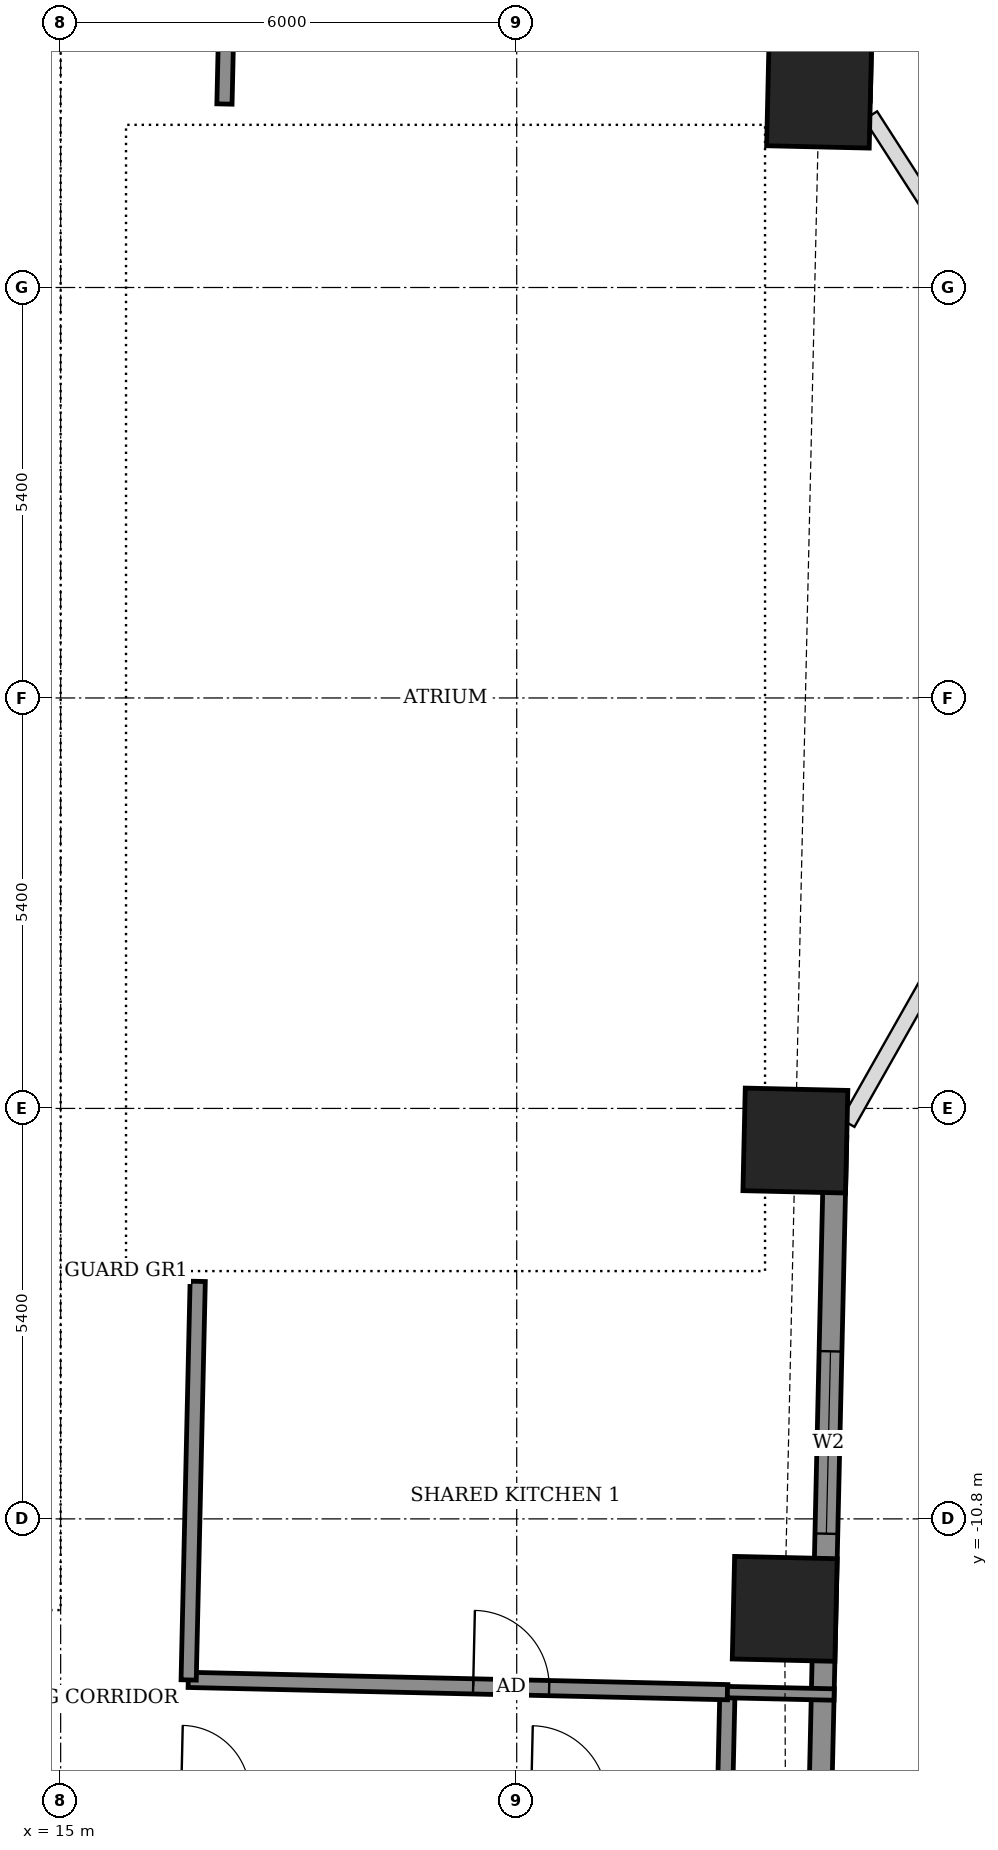
"""IFC4 building model, lengths in metres.
Left out: names, types, materials, properties, quantities, classifications, styles, units other than length and angle.
Written with IfcOpenShell. Run it as: python <this file> out.ifc"""

import sys

from ifc_helpers import new_model, si_unit, direction, frame, frame_2d, origin, origin_2d, place, context, subcontext, project, spatial, rectangle, extrude, element, fill, save


model = new_model("IFC4")
c1 = context("Model", 3, precision=1e-05, world=origin(), true_north=direction((0.0, 1.0)))
c2 = subcontext(c1, "Body", "Model", "MODEL_VIEW")
j1 = project(units=[si_unit("LENGTHUNIT", "METRE"), si_unit("PLANEANGLEUNIT", "RADIAN")], contexts=[c1])
p1 = place(None, origin())
s1 = spatial("IfcSite", under=j1, at=p1, CompositionType="ELEMENT")
p2 = place(p1, origin())
s2 = spatial("IfcBuilding", under=s1, at=p2, CompositionType="ELEMENT")
p3 = place(p2, frame((0.0, 0.0, 112.7)))
s3 = spatial("IfcBuildingStorey", under=s2, at=p3, CompositionType="ELEMENT", Elevation=112.7)
for number, where, z_axis, x_axis in (
    (1, (24.526, -11.984, -0.55), (0.0, 0.0, 1.0), (0.023, 1.0, 0.0)),
    (2, (24.666, -5.823, -0.55), (0.0, 0.0, 1.0), (0.023, 1.0, 0.0)),
    (3, (24.978, 7.924, -0.55), (0.0, 0.0, 1.0), (0.023, 1.0, 0.0)),
):
    element("IfcColumn", number, at=place(p3, frame(where, z_axis=z_axis, x_axis=x_axis)), inside=s3, PredefinedType="COLUMN", context=c2, shape_type="SweptSolid", body=[
        extrude(rectangle(XDim=1.35, YDim=1.35, at=origin_2d()), origin(), (0.0, 0.0, 1.0), 3.6),
    ])
p4 = place(p3, frame((24.915, -18.007, 0.0), z_axis=(0.0, 0.0, 1.0), x_axis=(0.02263706344, 0.999743748847, 0.0)))
e4 = element("IfcWall", 4, at=p4, inside=s3, PredefinedType="SOLIDWALL", context=c2, shape_type="SweptSolid", body=[
    extrude(rectangle(XDim=12.23, YDim=0.3, at=frame_2d((6.115, 0.0))), origin(), (0.0, 0.0, 1.0), 3.05),
])
p5 = place(p4, frame((2.187, 0.0, 0.0)))
e5 = element("IfcOpeningElement", 5, at=p5, cuts=e4, PredefinedType="OPENING", context=c2, shape_type="SweptSolid", body=[
    extrude(rectangle(XDim=1.5, YDim=2.4, at=frame_2d((0.75, 1.2))), frame((0.0, 0.16, 0.0), z_axis=(0.0, -1.0, 0.0), x_axis=(1.0, 0.0, 0.0)), (0.0, 0.0, 1.0), 0.32),
])
p6 = place(p4, frame((7.014, 0.0, 0.9)))
e6 = element("IfcOpeningElement", 6, at=p6, cuts=e4, PredefinedType="OPENING", context=c2, shape_type="SweptSolid", body=[
    extrude(rectangle(XDim=2.4, YDim=1.5, at=frame_2d((1.2, 0.75))), frame((0.0, 0.16, 0.0), z_axis=(0.0, -1.0, 0.0), x_axis=(1.0, 0.0, 0.0)), (0.0, 0.0, 1.0), 0.32),
])
p7 = place(p3, frame((25.502, 7.857, 0.0), z_axis=(0.0, 0.0, 1.0), x_axis=(0.022680323815, 0.999742768372, 0.0)))
e7 = element("IfcWall", 7, at=p7, inside=s3, PredefinedType="SOLIDWALL", context=c2, shape_type="SweptSolid", body=[
    extrude(rectangle(XDim=13.229, YDim=0.3, at=frame_2d((6.615, 0.0))), origin(), (0.0, 0.0, 1.0), 3.05),
])
p8 = place(p7, frame((1.542, 0.0, 0.0)))
e8 = element("IfcOpeningElement", 8, at=p8, cuts=e7, PredefinedType="OPENING", context=c2, shape_type="SweptSolid", body=[
    extrude(rectangle(XDim=1.5, YDim=2.4, at=frame_2d((0.75, 1.2))), frame((0.0, 0.16, 0.0), z_axis=(0.0, -1.0, 0.0), x_axis=(1.0, 0.0, 0.0)), (0.0, 0.0, 1.0), 0.32),
])
p9 = place(p7, frame((4.403, 0.0, 0.9)))
e9 = element("IfcOpeningElement", 9, at=p9, cuts=e7, PredefinedType="OPENING", context=c2, shape_type="SweptSolid", body=[
    extrude(rectangle(XDim=0.9, YDim=1.5, at=frame_2d((0.45, 0.75))), frame((0.0, 0.16, 0.0), z_axis=(0.0, -1.0, 0.0), x_axis=(1.0, 0.0, 0.0)), (0.0, 0.0, 1.0), 0.32),
])
p10 = place(p7, frame((8.549, 0.0, 0.9)))
e10 = element("IfcOpeningElement", 10, at=p10, cuts=e7, PredefinedType="OPENING", context=c2, shape_type="SweptSolid", body=[
    extrude(rectangle(XDim=2.4, YDim=1.5, at=frame_2d((1.2, 0.75))), frame((0.0, 0.16, 0.0), z_axis=(0.0, -1.0, 0.0), x_axis=(1.0, 0.0, 0.0)), (0.0, 0.0, 1.0), 0.32),
])
p11 = place(p3, frame((-26.978, -13.428, 0.0), z_axis=(0.0, 0.0, 1.0), x_axis=(0.999742553034, -0.02268981385, 0.0)))
e11 = element("IfcWall", 11, at=p11, inside=s3, PredefinedType="PARTITIONING", context=c2, shape_type="SweptSolid", body=[
    extrude(rectangle(XDim=50.733, YDim=0.2, at=frame_2d((25.366, 0.0))), origin(), (0.0, 0.0, 1.0), 3.05),
])
p12 = place(p11, frame((2.293, 0.0, 0.0)))
e12 = element("IfcOpeningElement", 12, at=p12, cuts=e11, PredefinedType="OPENING", context=c2, shape_type="SweptSolid", body=[
    extrude(rectangle(XDim=1.0, YDim=2.1, at=frame_2d((0.5, 1.05))), frame((0.0, 0.11, 0.0), z_axis=(0.0, -1.0, 0.0), x_axis=(1.0, 0.0, 0.0)), (0.0, 0.0, 1.0), 0.22),
])
p13 = place(p11, frame((9.65, 0.0, 0.0)))
e13 = element("IfcOpeningElement", 13, at=p13, cuts=e11, PredefinedType="OPENING", context=c2, shape_type="SweptSolid", body=[
    extrude(rectangle(XDim=0.9, YDim=2.1, at=frame_2d((0.45, 1.05))), frame((0.0, 0.11, 0.0), z_axis=(0.0, -1.0, 0.0), x_axis=(1.0, 0.0, 0.0)), (0.0, 0.0, 1.0), 0.22),
])
p14 = place(p11, frame((11.75, 0.0, 0.0)))
e14 = element("IfcOpeningElement", 14, at=p14, cuts=e11, PredefinedType="OPENING", context=c2, shape_type="SweptSolid", body=[
    extrude(rectangle(XDim=0.9, YDim=2.1, at=frame_2d((0.45, 1.05))), frame((0.0, 0.11, 0.0), z_axis=(0.0, -1.0, 0.0), x_axis=(1.0, 0.0, 0.0)), (0.0, 0.0, 1.0), 0.22),
])
p15 = place(p11, frame((18.675, 0.0, 0.0)))
e15 = element("IfcOpeningElement", 15, at=p15, cuts=e11, PredefinedType="OPENING", context=c2, shape_type="SweptSolid", body=[
    extrude(rectangle(XDim=0.9, YDim=2.1, at=frame_2d((0.45, 1.05))), frame((0.0, 0.11, 0.0), z_axis=(0.0, -1.0, 0.0), x_axis=(1.0, 0.0, 0.0)), (0.0, 0.0, 1.0), 0.22),
])
p16 = place(p11, frame((20.75, 0.0, 0.0)))
e16 = element("IfcOpeningElement", 16, at=p16, cuts=e11, PredefinedType="OPENING", context=c2, shape_type="SweptSolid", body=[
    extrude(rectangle(XDim=0.9, YDim=2.1, at=frame_2d((0.45, 1.05))), frame((0.0, 0.11, 0.0), z_axis=(0.0, -1.0, 0.0), x_axis=(1.0, 0.0, 0.0)), (0.0, 0.0, 1.0), 0.22),
])
p17 = place(p11, frame((27.725, 0.0, 0.0)))
e17 = element("IfcOpeningElement", 17, at=p17, cuts=e11, PredefinedType="OPENING", context=c2, shape_type="SweptSolid", body=[
    extrude(rectangle(XDim=0.9, YDim=2.1, at=frame_2d((0.45, 1.05))), frame((0.0, 0.11, 0.0), z_axis=(0.0, -1.0, 0.0), x_axis=(1.0, 0.0, 0.0)), (0.0, 0.0, 1.0), 0.22),
])
p18 = place(p11, frame((30.025, 0.0, 0.0)))
e18 = element("IfcOpeningElement", 18, at=p18, cuts=e11, PredefinedType="OPENING", context=c2, shape_type="SweptSolid", body=[
    extrude(rectangle(XDim=0.9, YDim=2.1, at=frame_2d((0.45, 1.05))), frame((0.0, 0.11, 0.0), z_axis=(0.0, -1.0, 0.0), x_axis=(1.0, 0.0, 0.0)), (0.0, 0.0, 1.0), 0.22),
])
p19 = place(p11, frame((36.95, 0.0, 0.0)))
e19 = element("IfcOpeningElement", 19, at=p19, cuts=e11, PredefinedType="OPENING", context=c2, shape_type="SweptSolid", body=[
    extrude(rectangle(XDim=0.9, YDim=2.1, at=frame_2d((0.45, 1.05))), frame((0.0, 0.11, 0.0), z_axis=(0.0, -1.0, 0.0), x_axis=(1.0, 0.0, 0.0)), (0.0, 0.0, 1.0), 0.22),
])
p20 = place(p11, frame((38.95, 0.0, 0.0)))
e20 = element("IfcOpeningElement", 20, at=p20, cuts=e11, PredefinedType="OPENING", context=c2, shape_type="SweptSolid", body=[
    extrude(rectangle(XDim=0.9, YDim=2.1, at=frame_2d((0.45, 1.05))), frame((0.0, 0.11, 0.0), z_axis=(0.0, -1.0, 0.0), x_axis=(1.0, 0.0, 0.0)), (0.0, 0.0, 1.0), 0.22),
])
p21 = place(p11, frame((48.179, 0.0, 0.0)))
e21 = element("IfcOpeningElement", 21, at=p21, cuts=e11, PredefinedType="OPENING", context=c2, shape_type="SweptSolid", body=[
    extrude(rectangle(XDim=1.0, YDim=2.1, at=frame_2d((0.5, 1.05))), frame((0.0, 0.11, 0.0), z_axis=(0.0, -1.0, 0.0), x_axis=(1.0, 0.0, 0.0)), (0.0, 0.0, 1.0), 0.22),
])
p22 = place(p11, frame((43.575, 0.0, 0.0)))
e22 = element("IfcOpeningElement", 22, at=p22, cuts=e11, PredefinedType="OPENING", context=c2, shape_type="SweptSolid", body=[
    extrude(rectangle(XDim=0.9, YDim=2.1, at=frame_2d((0.45, 1.05))), frame((0.0, 0.11, 0.0), z_axis=(0.0, -1.0, 0.0), x_axis=(1.0, 0.0, 0.0)), (0.0, 0.0, 1.0), 0.22),
])
p23 = place(p3, frame((23.738, -14.579, 0.0), z_axis=(0.0, 0.0, 1.0), x_axis=(0.022617910375, 0.999744182344, 0.0)))
e23 = element("IfcWall", 23, at=p23, inside=s3, PredefinedType="PARTITIONING", context=c2, shape_type="SweptSolid", body=[
    extrude(rectangle(XDim=1.5, YDim=0.2, at=frame_2d((0.75, 0.0))), origin(), (0.0, 0.0, 1.0), 3.05),
])
p24 = place(p3, frame((16.679, -12.918, 0.0), z_axis=(0.0, 0.0, 1.0), x_axis=(0.999739218926, -0.02283624622, 0.0)))
e24 = element("IfcWall", 24, at=p24, inside=s3, PredefinedType="PARTITIONING", context=c2, shape_type="SweptSolid", body=[
    extrude(rectangle(XDim=7.099, YDim=0.2, at=frame_2d((3.549, 0.0))), origin(), (0.0, 0.0, 1.0), 3.05),
])
p25 = place(p24, frame((3.749, 0.0, 0.0)))
e25 = element("IfcOpeningElement", 25, at=p25, cuts=e24, PredefinedType="OPENING", context=c2, shape_type="SweptSolid", body=[
    extrude(rectangle(XDim=1.0, YDim=2.1, at=frame_2d((0.5, 1.05))), frame((0.0, 0.11, 0.0), z_axis=(0.0, -1.0, 0.0), x_axis=(1.0, 0.0, 0.0)), (0.0, 0.0, 1.0), 0.22),
])
p26 = place(p3, frame((16.684, -12.919, 0.0), z_axis=(0.0, 0.0, 1.0), x_axis=(0.022667483124, 0.999743059595, 0.0)))
e26 = element("IfcWall", 26, at=p26, inside=s3, PredefinedType="PARTITIONING", context=c2, shape_type="SweptSolid", body=[
    extrude(rectangle(XDim=5.245, YDim=0.2, at=frame_2d((2.623, 0.0))), origin(), (0.0, 0.0, 1.0), 3.05),
])
p27 = place(p3, frame((23.772, -13.079, 0.0), z_axis=(0.0, 0.0, 1.0), x_axis=(0.999740667531, -0.022772739949, 0.0)))
e27 = element("IfcWall", 27, at=p27, inside=s3, PredefinedType="PARTITIONING", context=c2, shape_type="SweptSolid", body=[
    extrude(rectangle(XDim=1.404, YDim=0.15, at=frame_2d((0.702, 0.0))), origin(), (0.0, 0.0, 1.0), 2.55),
])
p28 = place(p3, frame((17.155, 7.814, 0.0), z_axis=(0.0, 0.0, 1.0), x_axis=(0.022578158225, 0.999745080894, 0.0)))
e28 = element("IfcWall", 28, at=p28, inside=s3, PredefinedType="PARTITIONING", context=c2, shape_type="SweptSolid", body=[
    extrude(rectangle(XDim=4.336, YDim=0.2, at=frame_2d((2.168, 0.0))), origin(), (0.0, 0.0, 1.0), 3.05),
])
p29 = place(p6, origin())
e29 = element("IfcWindow", 29, at=p29, inside=s3, PartitioningType="DOUBLE_PANEL_VERTICAL", PredefinedType="WINDOW", context=c2, shape_type="SweptSolid", body=[
    extrude(rectangle(XDim=2.4, YDim=1.5, at=frame_2d((1.2, 0.75))), frame((0.0, 0.03, 0.0), z_axis=(0.0, -1.0, 0.0), x_axis=(1.0, 0.0, 0.0)), (0.0, 0.0, 1.0), 0.06),
])
fill(e6, e29)
p30 = place(p25, origin())
e30 = element("IfcDoor", 30, at=p30, inside=s3, OperationType="SINGLE_SWING_LEFT", PredefinedType="DOOR", context=c2, shape_type="SweptSolid", body=[
    extrude(rectangle(XDim=1.0, YDim=2.1, at=frame_2d((0.5, 1.05))), frame((0.0, 0.025, 0.0), z_axis=(0.0, -1.0, 0.0), x_axis=(1.0, 0.0, 0.0)), (0.0, 0.0, 1.0), 0.05),
])
fill(e25, e30)
save(model, sys.argv[1])
